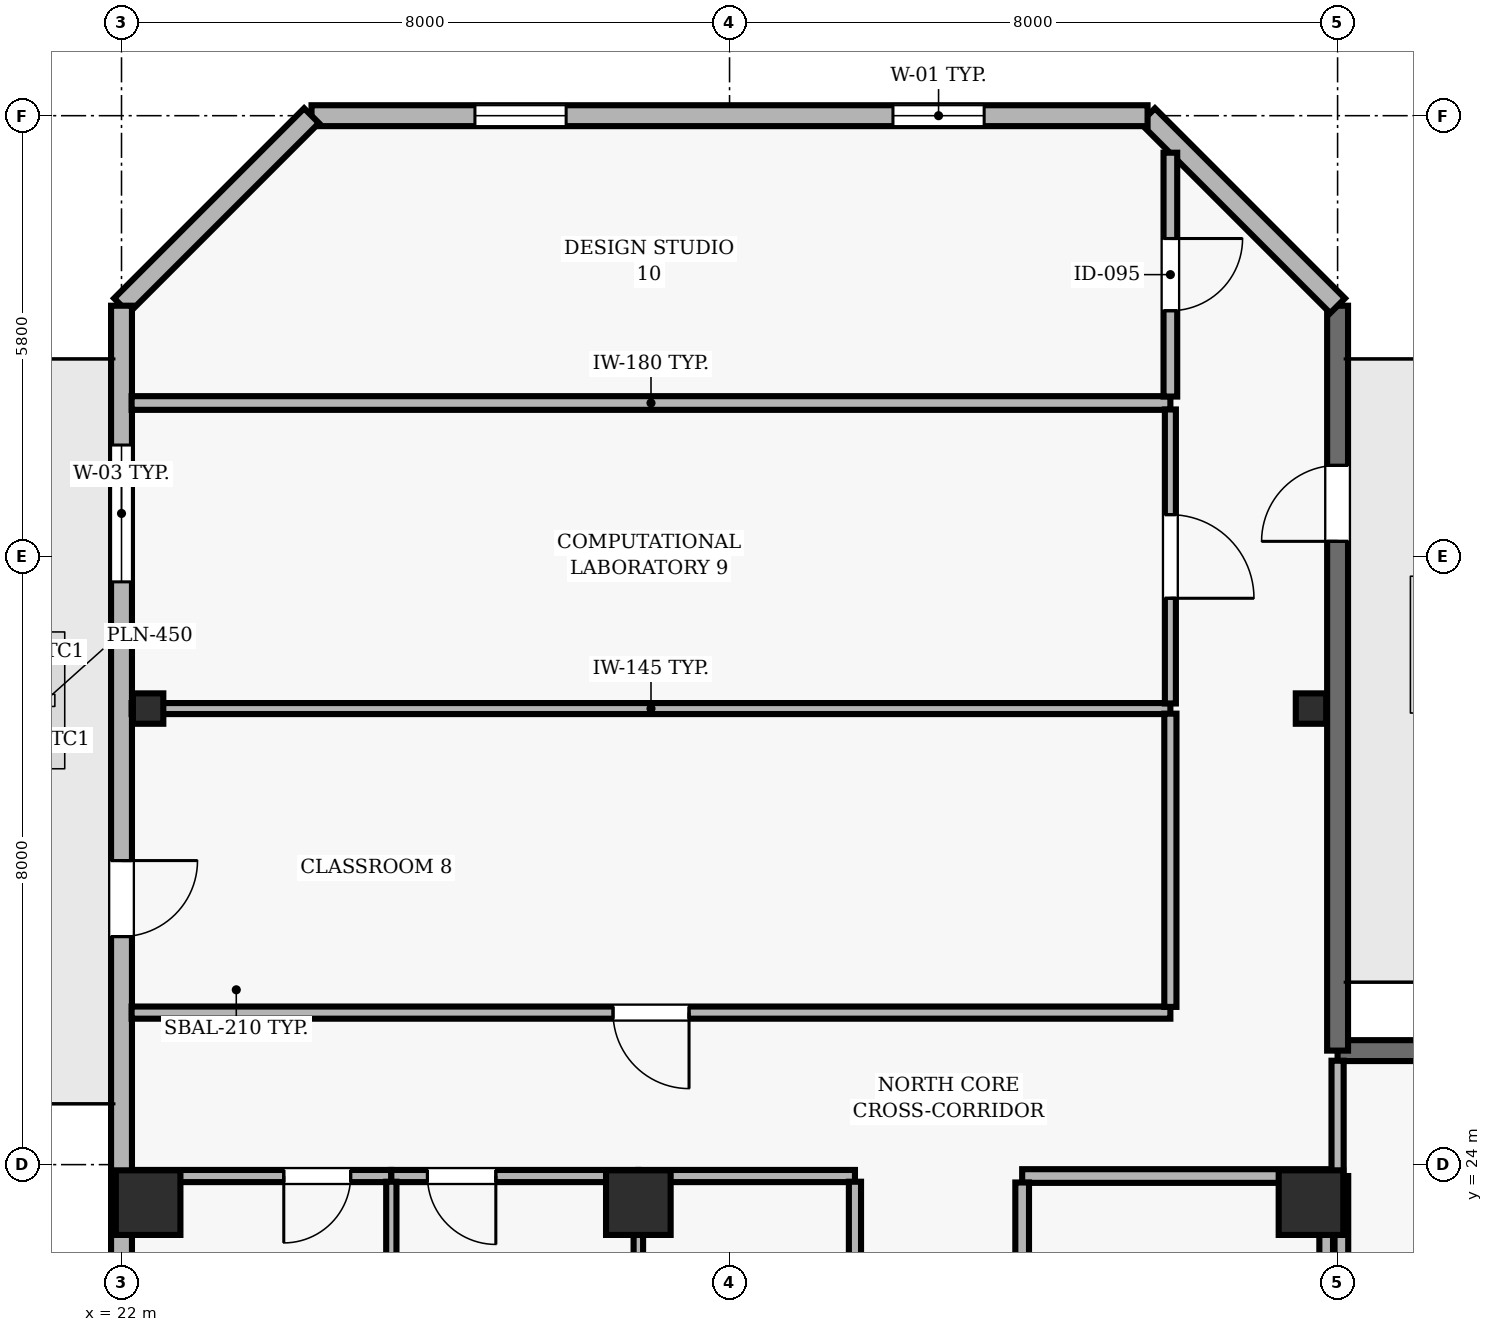
"""IFC4 building model, lengths in metres.
Left out: names, types, materials, properties, quantities, classifications, styles, units other than length and angle.
Written with IfcOpenShell. Run it as: python <this file> out.ifc"""

import sys

from ifc_helpers import new_model, si_unit, direction, frame, frame_2d, origin, origin_2d, place, context, subcontext, project, spatial, rectangle, hollow_rectangle, extrude, element, fill, save


model = new_model("IFC4")
c1 = context("Model", 3, precision=1e-05, world=origin(), true_north=direction((0.0, 1.0)))
c2 = subcontext(c1, "Body", "Model", "MODEL_VIEW")
j1 = project(units=[si_unit("LENGTHUNIT", "METRE"), si_unit("PLANEANGLEUNIT", "RADIAN")], contexts=[c1])
p1 = place(None, origin())
s1 = spatial("IfcSite", under=j1, at=p1, CompositionType="ELEMENT")
p2 = place(p1, origin())
s2 = spatial("IfcBuilding", under=s1, at=p2, CompositionType="ELEMENT")
p3 = place(p2, frame((0.0, 0.0, 256.0)))
s3 = spatial("IfcBuildingStorey", under=s2, at=p3, CompositionType="ELEMENT", Elevation=256.0)
for number, where, z_axis, x_axis in (
    (1, (22.35, 23.5, 0.0), (0.0, 0.0, 1.0), (1.0, 0.0, 0.0)),
    (2, (28.8, 23.5, 0.0), (0.0, 0.0, 1.0), (1.0, 0.0, 0.0)),
    (3, (37.65, 23.5, 0.0), (0.0, 0.0, 1.0), (1.0, 0.0, 0.0)),
):
    element("IfcColumn", number, at=place(p3, frame(where, z_axis=z_axis, x_axis=x_axis)), inside=s3, PredefinedType="COLUMN", context=c2, shape_type="SweptSolid", body=[
        extrude(rectangle(XDim=0.85, YDim=0.85, at=origin_2d()), origin(), (0.0, 0.0, 1.0), 3.9),
    ])
for number, where, z_axis, x_axis in (
    (4, (22.35, 30.0, 0.0), (0.0, 0.0, 1.0), (1.0, 0.0, 0.0)),
    (5, (37.65, 30.0, 0.0), (0.0, 0.0, 1.0), (1.0, 0.0, 0.0)),
):
    element("IfcColumn", number, at=place(p3, frame(where, z_axis=z_axis, x_axis=x_axis)), inside=s3, PredefinedType="COLUMN", context=c2, shape_type="SweptSolid", body=[
        extrude(hollow_rectangle(XDim=0.4, YDim=0.4, WallThickness=0.02, at=origin_2d()), origin(), (0.0, 0.0, 1.0), 3.9),
    ])
p4 = place(p3, frame((43.64, 25.5, 0.0), z_axis=(0.0, 0.0, 1.0), x_axis=(-1.0, 0.0, 0.0)))
e6 = element("IfcWall", 6, at=p4, inside=s3, PredefinedType="SOLIDWALL", context=c2, shape_type="SweptSolid", body=[
    extrude(rectangle(XDim=5.64, YDim=0.275, at=frame_2d((2.82, 0.0))), origin(), (0.0, 0.0, 1.0), 3.69),
])
p5 = place(p4, frame((1.92, 0.0, 0.9)))
e7 = element("IfcOpeningElement", 7, at=p5, cuts=e6, PredefinedType="OPENING", context=c2, shape_type="SweptSolid", body=[
    extrude(rectangle(XDim=1.8, YDim=2.2, at=frame_2d((0.9, 1.1))), frame((0.0, 0.147, 0.0), z_axis=(0.0, -1.0, 0.0), x_axis=(1.0, 0.0, 0.0)), (0.0, 0.0, 1.0), 0.295),
])
p6 = place(p3, frame((38.0, 25.5, 0.0), z_axis=(0.0, 0.0, 1.0), x_axis=(0.0, 1.0, 0.0)))
e8 = element("IfcWall", 8, at=p6, inside=s3, PredefinedType="SOLIDWALL", context=c2, shape_type="SweptSolid", body=[
    extrude(rectangle(XDim=9.8, YDim=0.275, at=frame_2d((4.9, 0.0))), origin(), (0.0, 0.0, 1.0), 3.69),
])
p7 = place(p6, frame((6.7, 0.0, 0.0)))
e9 = element("IfcOpeningElement", 9, at=p7, cuts=e8, PredefinedType="OPENING", context=c2, shape_type="SweptSolid", body=[
    extrude(rectangle(XDim=1.0, YDim=2.2, at=frame_2d((0.5, 1.1))), frame((0.0, 0.147, 0.0), z_axis=(0.0, -1.0, 0.0), x_axis=(1.0, 0.0, 0.0)), (0.0, 0.0, 1.0), 0.295),
])
p8 = place(p3, frame((38.0, 35.3, 0.0), z_axis=(0.0, 0.0, 1.0), x_axis=(-0.707106781187, 0.707106781187, 0.0)))
e10 = element("IfcWall", 10, at=p8, inside=s3, PredefinedType="SOLIDWALL", context=c2, shape_type="SweptSolid", body=[
    extrude(rectangle(XDim=3.536, YDim=0.275, at=frame_2d((1.768, 0.0))), origin(), (0.0, 0.0, 1.0), 3.69),
])
p9 = place(p3, frame((35.5, 37.8, 0.0), z_axis=(0.0, 0.0, 1.0), x_axis=(-1.0, 0.0, 0.0)))
e11 = element("IfcWall", 11, at=p9, inside=s3, PredefinedType="SOLIDWALL", context=c2, shape_type="SweptSolid", body=[
    extrude(rectangle(XDim=11.0, YDim=0.275, at=frame_2d((5.5, 0.0))), origin(), (0.0, 0.0, 1.0), 3.69),
])
p10 = place(p9, frame((2.15, 0.0, 0.9)))
e12 = element("IfcOpeningElement", 12, at=p10, cuts=e11, PredefinedType="OPENING", context=c2, shape_type="SweptSolid", body=[
    extrude(rectangle(XDim=1.2, YDim=1.6, at=frame_2d((0.6, 0.8))), frame((0.0, 0.147, 0.0), z_axis=(0.0, -1.0, 0.0), x_axis=(1.0, 0.0, 0.0)), (0.0, 0.0, 1.0), 0.295),
])
p11 = place(p9, frame((7.65, 0.0, 0.9)))
e13 = element("IfcOpeningElement", 13, at=p11, cuts=e11, PredefinedType="OPENING", context=c2, shape_type="SweptSolid", body=[
    extrude(rectangle(XDim=1.2, YDim=1.6, at=frame_2d((0.6, 0.8))), frame((0.0, 0.147, 0.0), z_axis=(0.0, -1.0, 0.0), x_axis=(1.0, 0.0, 0.0)), (0.0, 0.0, 1.0), 0.295),
])
p12 = place(p3, frame((24.5, 37.8, 0.0), z_axis=(0.0, 0.0, 1.0), x_axis=(-0.707106781187, -0.707106781187, 0.0)))
e14 = element("IfcWall", 14, at=p12, inside=s3, PredefinedType="SOLIDWALL", context=c2, shape_type="SweptSolid", body=[
    extrude(rectangle(XDim=3.536, YDim=0.275, at=frame_2d((1.768, 0.0))), origin(), (0.0, 0.0, 1.0), 3.69),
])
p13 = place(p3, frame((22.0, 35.3, 0.0), z_axis=(0.0, 0.0, 1.0), x_axis=(0.0, -1.0, 0.0)))
e15 = element("IfcWall", 15, at=p13, inside=s3, PredefinedType="SOLIDWALL", context=c2, shape_type="SweptSolid", body=[
    extrude(rectangle(XDim=32.8, YDim=0.275, at=frame_2d((16.4, 0.0))), origin(), (0.0, 0.0, 1.0), 3.69),
])
p14 = place(p13, frame((7.3, 0.0, 0.0)))
e16 = element("IfcOpeningElement", 16, at=p14, cuts=e15, PredefinedType="OPENING", context=c2, shape_type="SweptSolid", body=[
    extrude(rectangle(XDim=1.0, YDim=2.2, at=frame_2d((0.5, 1.1))), frame((0.0, 0.147, 0.0), z_axis=(0.0, -1.0, 0.0), x_axis=(1.0, 0.0, 0.0)), (0.0, 0.0, 1.0), 0.295),
])
p15 = place(p13, frame((1.833, 0.0, 0.9)))
e17 = element("IfcOpeningElement", 17, at=p15, cuts=e15, PredefinedType="OPENING", context=c2, shape_type="SweptSolid", body=[
    extrude(rectangle(XDim=1.8, YDim=1.6, at=frame_2d((0.9, 0.8))), frame((0.0, 0.147, 0.0), z_axis=(0.0, -1.0, 0.0), x_axis=(1.0, 0.0, 0.0)), (0.0, 0.0, 1.0), 0.295),
])
p16 = place(p13, frame((12.767, 0.0, 0.9)))
e18 = element("IfcOpeningElement", 18, at=p16, cuts=e15, PredefinedType="OPENING", context=c2, shape_type="SweptSolid", body=[
    extrude(rectangle(XDim=1.8, YDim=1.6, at=frame_2d((0.9, 0.8))), frame((0.0, 0.147, 0.0), z_axis=(0.0, -1.0, 0.0), x_axis=(1.0, 0.0, 0.0)), (0.0, 0.0, 1.0), 0.295),
])
p17 = place(p13, frame((18.233, 0.0, 0.9)))
e19 = element("IfcOpeningElement", 19, at=p17, cuts=e15, PredefinedType="OPENING", context=c2, shape_type="SweptSolid", body=[
    extrude(rectangle(XDim=1.8, YDim=1.6, at=frame_2d((0.9, 0.8))), frame((0.0, 0.147, 0.0), z_axis=(0.0, -1.0, 0.0), x_axis=(1.0, 0.0, 0.0)), (0.0, 0.0, 1.0), 0.295),
])
p18 = place(p13, frame((23.7, 0.0, 0.9)))
e20 = element("IfcOpeningElement", 20, at=p18, cuts=e15, PredefinedType="OPENING", context=c2, shape_type="SweptSolid", body=[
    extrude(rectangle(XDim=1.8, YDim=1.6, at=frame_2d((0.9, 0.8))), frame((0.0, 0.147, 0.0), z_axis=(0.0, -1.0, 0.0), x_axis=(1.0, 0.0, 0.0)), (0.0, 0.0, 1.0), 0.295),
])
p19 = place(p3, frame((25.55, 23.85, 0.0), z_axis=(0.0, 0.0, 1.0), x_axis=(-1.0, 0.0, 0.0)))
e21 = element("IfcWall", 21, at=p19, inside=s3, PredefinedType="PARTITIONING", context=c2, shape_type="SweptSolid", body=[
    extrude(rectangle(XDim=3.35, YDim=0.16, at=frame_2d((1.675, 0.0))), origin(), (0.0, 0.0, 1.0), 3.221),
])
p20 = place(p19, frame((0.535, 0.0, 0.0)))
e22 = element("IfcOpeningElement", 22, at=p20, cuts=e21, PredefinedType="OPENING", context=c2, shape_type="SweptSolid", body=[
    extrude(rectangle(XDim=0.88, YDim=2.1, at=frame_2d((0.44, 1.05))), frame((0.0, 0.09, 0.0), z_axis=(0.0, -1.0, 0.0), x_axis=(1.0, 0.0, 0.0)), (0.0, 0.0, 1.0), 0.18),
])
p21 = place(p3, frame((28.8, 23.85, 0.0), z_axis=(0.0, 0.0, 1.0), x_axis=(-1.0, 0.0, 0.0)))
e23 = element("IfcWall", 23, at=p21, inside=s3, PredefinedType="PARTITIONING", context=c2, shape_type="SweptSolid", body=[
    extrude(rectangle(XDim=3.25, YDim=0.16, at=frame_2d((1.625, 0.0))), origin(), (0.0, 0.0, 1.0), 3.221),
])
p22 = place(p21, frame((1.875, 0.0, 0.0)))
e24 = element("IfcOpeningElement", 24, at=p22, cuts=e23, PredefinedType="OPENING", context=c2, shape_type="SweptSolid", body=[
    extrude(rectangle(XDim=0.9, YDim=2.1, at=frame_2d((0.45, 1.05))), frame((0.0, 0.09, 0.0), z_axis=(0.0, -1.0, 0.0), x_axis=(1.0, 0.0, 0.0)), (0.0, 0.0, 1.0), 0.18),
])
p23 = place(p3, frame((31.65, 23.85, 0.0), z_axis=(0.0, 0.0, 1.0), x_axis=(-1.0, 0.0, 0.0)))
e25 = element("IfcWall", 25, at=p23, inside=s3, PredefinedType="PARTITIONING", context=c2, shape_type="SweptSolid", body=[
    extrude(rectangle(XDim=2.85, YDim=0.16, at=frame_2d((1.425, 0.0))), origin(), (0.0, 0.0, 1.0), 3.221),
])
p24 = place(p3, frame((35.8, 26.0, 0.0), z_axis=(0.0, 0.0, 1.0), x_axis=(-1.0, 0.0, 0.0)))
e26 = element("IfcWall", 26, at=p24, inside=s3, PredefinedType="PARTITIONING", context=c2, shape_type="SweptSolid", body=[
    extrude(rectangle(XDim=13.667, YDim=0.16, at=frame_2d((6.833, 0.0))), origin(), (0.0, 0.0, 1.0), 3.69),
])
p25 = place(p24, frame((6.333, 0.0, 0.0)))
e27 = element("IfcOpeningElement", 27, at=p25, cuts=e26, PredefinedType="OPENING", context=c2, shape_type="SweptSolid", body=[
    extrude(rectangle(XDim=1.0, YDim=2.1, at=frame_2d((0.5, 1.05))), frame((0.0, 0.09, 0.0), z_axis=(0.0, -1.0, 0.0), x_axis=(1.0, 0.0, 0.0)), (0.0, 0.0, 1.0), 0.18),
])
p26 = place(p3, frame((35.8, 30.0, 0.0), z_axis=(0.0, 0.0, 1.0), x_axis=(-1.0, 0.0, 0.0)))
e28 = element("IfcWall", 28, at=p26, inside=s3, PredefinedType="PARTITIONING", context=c2, shape_type="SweptSolid", body=[
    extrude(rectangle(XDim=13.667, YDim=0.145, at=frame_2d((6.833, 0.0))), origin(), (0.0, 0.0, 1.0), 3.221),
])
p27 = place(p3, frame((35.8, 34.02, 0.0), z_axis=(0.0, 0.0, 1.0), x_axis=(-1.0, 0.0, 0.0)))
e29 = element("IfcWall", 29, at=p27, inside=s3, PredefinedType="PARTITIONING", context=c2, shape_type="SweptSolid", body=[
    extrude(rectangle(XDim=13.667, YDim=0.18, at=frame_2d((6.833, 0.0))), origin(), (0.0, 0.0, 1.0), 3.69),
])
p28 = place(p3, frame((37.85, 23.85, 0.0), z_axis=(0.0, 0.0, 1.0), x_axis=(-1.0, 0.0, 0.0)))
e30 = element("IfcWall", 30, at=p28, inside=s3, PredefinedType="PARTITIONING", context=c2, shape_type="SweptSolid", body=[
    extrude(rectangle(XDim=4.0, YDim=0.18, at=frame_2d((2.0, 0.0))), origin(), (0.0, 0.0, 1.0), 3.221),
])
p29 = place(p3, frame((25.55, 19.16, 0.0), z_axis=(0.0, 0.0, 1.0), x_axis=(0.0, 1.0, 0.0)))
e31 = element("IfcWall", 31, at=p29, inside=s3, PredefinedType="PARTITIONING", context=c2, shape_type="SweptSolid", body=[
    extrude(rectangle(XDim=4.615, YDim=0.135, at=frame_2d((2.308, 0.0))), origin(), (0.0, 0.0, 1.0), 3.69),
])
p30 = place(p3, frame((28.8, 23.775, 0.0), z_axis=(0.0, 0.0, 1.0), x_axis=(0.0, -1.0, 0.0)))
e32 = element("IfcWall", 32, at=p30, inside=s3, PredefinedType="PARTITIONING", context=c2, shape_type="SweptSolid", body=[
    extrude(rectangle(XDim=4.615, YDim=0.125, at=frame_2d((2.308, 0.0))), origin(), (0.0, 0.0, 1.0), 3.69),
])
p31 = place(p3, frame((31.65, 19.01, 0.0), z_axis=(0.0, 0.0, 1.0), x_axis=(0.0, 1.0, 0.0)))
e33 = element("IfcWall", 33, at=p31, inside=s3, PredefinedType="PARTITIONING", context=c2, shape_type="SweptSolid", body=[
    extrude(rectangle(XDim=4.765, YDim=0.16, at=frame_2d((2.382, 0.0))), origin(), (0.0, 0.0, 1.0), 3.69),
])
p32 = place(p31, frame((1.932, 0.0, 0.0)))
e34 = element("IfcOpeningElement", 34, at=p32, cuts=e33, PredefinedType="OPENING", context=c2, shape_type="SweptSolid", body=[
    extrude(rectangle(XDim=0.9, YDim=2.1, at=frame_2d((0.45, 1.05))), frame((0.0, 0.09, 0.0), z_axis=(0.0, -1.0, 0.0), x_axis=(1.0, 0.0, 0.0)), (0.0, 0.0, 1.0), 0.18),
])
p33 = place(p3, frame((33.85, 17.735, 0.0), z_axis=(0.0, 0.0, 1.0), x_axis=(0.0, 1.0, 0.0)))
e35 = element("IfcWall", 35, at=p33, inside=s3, PredefinedType="PARTITIONING", context=c2, shape_type="SweptSolid", body=[
    extrude(rectangle(XDim=6.03, YDim=0.18, at=frame_2d((3.015, 0.0))), origin(), (0.0, 0.0, 1.0), 3.69),
])
p34 = place(p33, frame((2.54, 0.0, 0.0)))
e36 = element("IfcOpeningElement", 36, at=p34, cuts=e35, PredefinedType="OPENING", context=c2, shape_type="SweptSolid", body=[
    extrude(rectangle(XDim=0.95, YDim=2.1, at=frame_2d((0.475, 1.05))), frame((0.0, 0.1, 0.0), z_axis=(0.0, -1.0, 0.0), x_axis=(1.0, 0.0, 0.0)), (0.0, 0.0, 1.0), 0.2),
])
p35 = place(p3, frame((35.8, 29.933, 0.0), z_axis=(0.0, 0.0, 1.0), x_axis=(0.0, -1.0, 0.0)))
e37 = element("IfcWall", 37, at=p35, inside=s3, PredefinedType="PARTITIONING", context=c2, shape_type="SweptSolid", body=[
    extrude(rectangle(XDim=3.858, YDim=0.16, at=frame_2d((1.929, 0.0))), origin(), (0.0, 0.0, 1.0), 3.69),
])
p36 = place(p3, frame((35.8, 33.935, 0.0), z_axis=(0.0, 0.0, 1.0), x_axis=(0.0, -1.0, 0.0)))
e38 = element("IfcWall", 38, at=p36, inside=s3, PredefinedType="PARTITIONING", context=c2, shape_type="SweptSolid", body=[
    extrude(rectangle(XDim=3.868, YDim=0.145, at=frame_2d((1.934, 0.0))), origin(), (0.0, 0.0, 1.0), 3.69),
])
p37 = place(p36, frame((1.384, 0.0, 0.0)))
e39 = element("IfcOpeningElement", 39, at=p37, cuts=e38, PredefinedType="OPENING", context=c2, shape_type="SweptSolid", body=[
    extrude(rectangle(XDim=1.1, YDim=2.15, at=frame_2d((0.55, 1.075))), frame((0.0, 0.083, 0.0), z_axis=(0.0, -1.0, 0.0), x_axis=(1.0, 0.0, 0.0)), (0.0, 0.0, 1.0), 0.165),
])
p38 = place(p3, frame((35.8, 37.313, 0.0), z_axis=(0.0, 0.0, 1.0), x_axis=(0.0, -1.0, 0.0)))
e40 = element("IfcWall", 40, at=p38, inside=s3, PredefinedType="PARTITIONING", context=c2, shape_type="SweptSolid", body=[
    extrude(rectangle(XDim=3.208, YDim=0.18, at=frame_2d((1.604, 0.0))), origin(), (0.0, 0.0, 1.0), 3.69),
])
p39 = place(p38, frame((1.129, 0.0, 0.0)))
e41 = element("IfcOpeningElement", 41, at=p39, cuts=e40, PredefinedType="OPENING", context=c2, shape_type="SweptSolid", body=[
    extrude(rectangle(XDim=0.95, YDim=2.1, at=frame_2d((0.475, 1.05))), frame((0.0, 0.1, 0.0), z_axis=(0.0, -1.0, 0.0), x_axis=(1.0, 0.0, 0.0)), (0.0, 0.0, 1.0), 0.2),
])
p40 = place(p3, frame((37.85, 17.65, 0.0), z_axis=(0.0, 0.0, 1.0), x_axis=(0.0, 1.0, 0.0)))
e42 = element("IfcWall", 42, at=p40, inside=s3, PredefinedType="PARTITIONING", context=c2, shape_type="SweptSolid", body=[
    extrude(rectangle(XDim=6.115, YDim=0.18, at=frame_2d((3.058, 0.0))), origin(), (0.0, 0.0, 1.0), 3.221),
])
p41 = place(p3, frame((38.0, 23.85, 0.0), z_axis=(0.0, 0.0, 1.0), x_axis=(0.0, 1.0, 0.0)))
e43 = element("IfcWall", 43, at=p41, inside=s3, PredefinedType="PARTITIONING", context=c2, shape_type="SweptSolid", body=[
    extrude(rectangle(XDim=1.517, YDim=0.16, at=frame_2d((0.758, 0.0))), origin(), (0.0, 0.0, 1.0), 3.221),
])
p42 = place(p3, frame((38.05, 23.85, 0.0), z_axis=(0.0, 0.0, 1.0), x_axis=(0.0, -1.0, 0.0)))
e44 = element("IfcWall", 44, at=p42, inside=s3, PredefinedType="PARTITIONING", context=c2, shape_type="SweptSolid", body=[
    extrude(rectangle(XDim=7.775, YDim=0.18, at=frame_2d((3.888, 0.0))), origin(), (0.0, 0.0, 1.0), 3.221),
])
p43 = place(p7, origin())
e45 = element("IfcDoor", 45, at=p43, inside=s3, OperationType="SINGLE_SWING_LEFT", PredefinedType="DOOR", context=c2, shape_type="SweptSolid", body=[
    extrude(rectangle(XDim=1.0, YDim=2.2, at=frame_2d((0.5, 1.1))), frame((0.0, 0.025, 0.0), z_axis=(0.0, -1.0, 0.0), x_axis=(1.0, 0.0, 0.0)), (0.0, 0.0, 1.0), 0.05),
])
fill(e9, e45)
p44 = place(p10, origin())
e46 = element("IfcWindow", 46, at=p44, inside=s3, PartitioningType="SINGLE_PANEL", PredefinedType="WINDOW", context=c2, shape_type="SweptSolid", body=[
    extrude(rectangle(XDim=1.2, YDim=1.6, at=frame_2d((0.6, 0.8))), frame((0.0, 0.03, 0.0), z_axis=(0.0, -1.0, 0.0), x_axis=(1.0, 0.0, 0.0)), (0.0, 0.0, 1.0), 0.06),
])
fill(e12, e46)
p45 = place(p11, origin())
e47 = element("IfcWindow", 47, at=p45, inside=s3, PartitioningType="SINGLE_PANEL", PredefinedType="WINDOW", context=c2, shape_type="SweptSolid", body=[
    extrude(rectangle(XDim=1.2, YDim=1.6, at=frame_2d((0.6, 0.8))), frame((0.0, 0.03, 0.0), z_axis=(0.0, -1.0, 0.0), x_axis=(1.0, 0.0, 0.0)), (0.0, 0.0, 1.0), 0.06),
])
fill(e13, e47)
p46 = place(p14, origin())
e48 = element("IfcDoor", 48, at=p46, inside=s3, OperationType="SINGLE_SWING_LEFT", PredefinedType="DOOR", context=c2, shape_type="SweptSolid", body=[
    extrude(rectangle(XDim=1.0, YDim=2.2, at=frame_2d((0.5, 1.1))), frame((0.0, 0.025, 0.0), z_axis=(0.0, -1.0, 0.0), x_axis=(1.0, 0.0, 0.0)), (0.0, 0.0, 1.0), 0.05),
])
fill(e16, e48)
p47 = place(p15, origin())
e49 = element("IfcWindow", 49, at=p47, inside=s3, PartitioningType="SINGLE_PANEL", PredefinedType="WINDOW", context=c2, shape_type="SweptSolid", body=[
    extrude(rectangle(XDim=1.8, YDim=1.6, at=frame_2d((0.9, 0.8))), frame((0.0, 0.03, 0.0), z_axis=(0.0, -1.0, 0.0), x_axis=(1.0, 0.0, 0.0)), (0.0, 0.0, 1.0), 0.06),
])
fill(e17, e49)
p48 = place(p20, origin())
e50 = element("IfcDoor", 50, at=p48, inside=s3, OperationType="SINGLE_SWING_RIGHT", PredefinedType="DOOR", context=c2, shape_type="SweptSolid", body=[
    extrude(rectangle(XDim=0.88, YDim=2.1, at=frame_2d((0.44, 1.05))), frame((0.0, 0.025, 0.0), z_axis=(0.0, -1.0, 0.0), x_axis=(1.0, 0.0, 0.0)), (0.0, 0.0, 1.0), 0.05),
])
fill(e22, e50)
p49 = place(p22, origin())
e51 = element("IfcDoor", 51, at=p49, inside=s3, OperationType="SINGLE_SWING_LEFT", PredefinedType="DOOR", context=c2, shape_type="SweptSolid", body=[
    extrude(rectangle(XDim=0.9, YDim=2.1, at=frame_2d((0.45, 1.05))), frame((0.0, 0.025, 0.0), z_axis=(0.0, -1.0, 0.0), x_axis=(1.0, 0.0, 0.0)), (0.0, 0.0, 1.0), 0.05),
])
fill(e24, e51)
p50 = place(p25, origin())
e52 = element("IfcDoor", 52, at=p50, inside=s3, OperationType="SINGLE_SWING_LEFT", PredefinedType="DOOR", context=c2, shape_type="SweptSolid", body=[
    extrude(rectangle(XDim=1.0, YDim=2.1, at=frame_2d((0.5, 1.05))), frame((0.0, 0.025, 0.0), z_axis=(0.0, -1.0, 0.0), x_axis=(1.0, 0.0, 0.0)), (0.0, 0.0, 1.0), 0.05),
])
fill(e27, e52)
p51 = place(p37, origin())
e53 = element("IfcDoor", 53, at=p51, inside=s3, OperationType="SINGLE_SWING_RIGHT", PredefinedType="DOOR", context=c2, shape_type="SweptSolid", body=[
    extrude(rectangle(XDim=1.1, YDim=2.15, at=frame_2d((0.55, 1.075))), frame((0.0, 0.025, 0.0), z_axis=(0.0, -1.0, 0.0), x_axis=(1.0, 0.0, 0.0)), (0.0, 0.0, 1.0), 0.05),
])
fill(e39, e53)
p52 = place(p39, origin())
e54 = element("IfcDoor", 54, at=p52, inside=s3, OperationType="SINGLE_SWING_LEFT", PredefinedType="DOOR", context=c2, shape_type="SweptSolid", body=[
    extrude(rectangle(XDim=0.95, YDim=2.1, at=frame_2d((0.475, 1.05))), frame((0.0, 0.025, 0.0), z_axis=(0.0, -1.0, 0.0), x_axis=(1.0, 0.0, 0.0)), (0.0, 0.0, 1.0), 0.05),
])
fill(e41, e54)
save(model, sys.argv[1])
